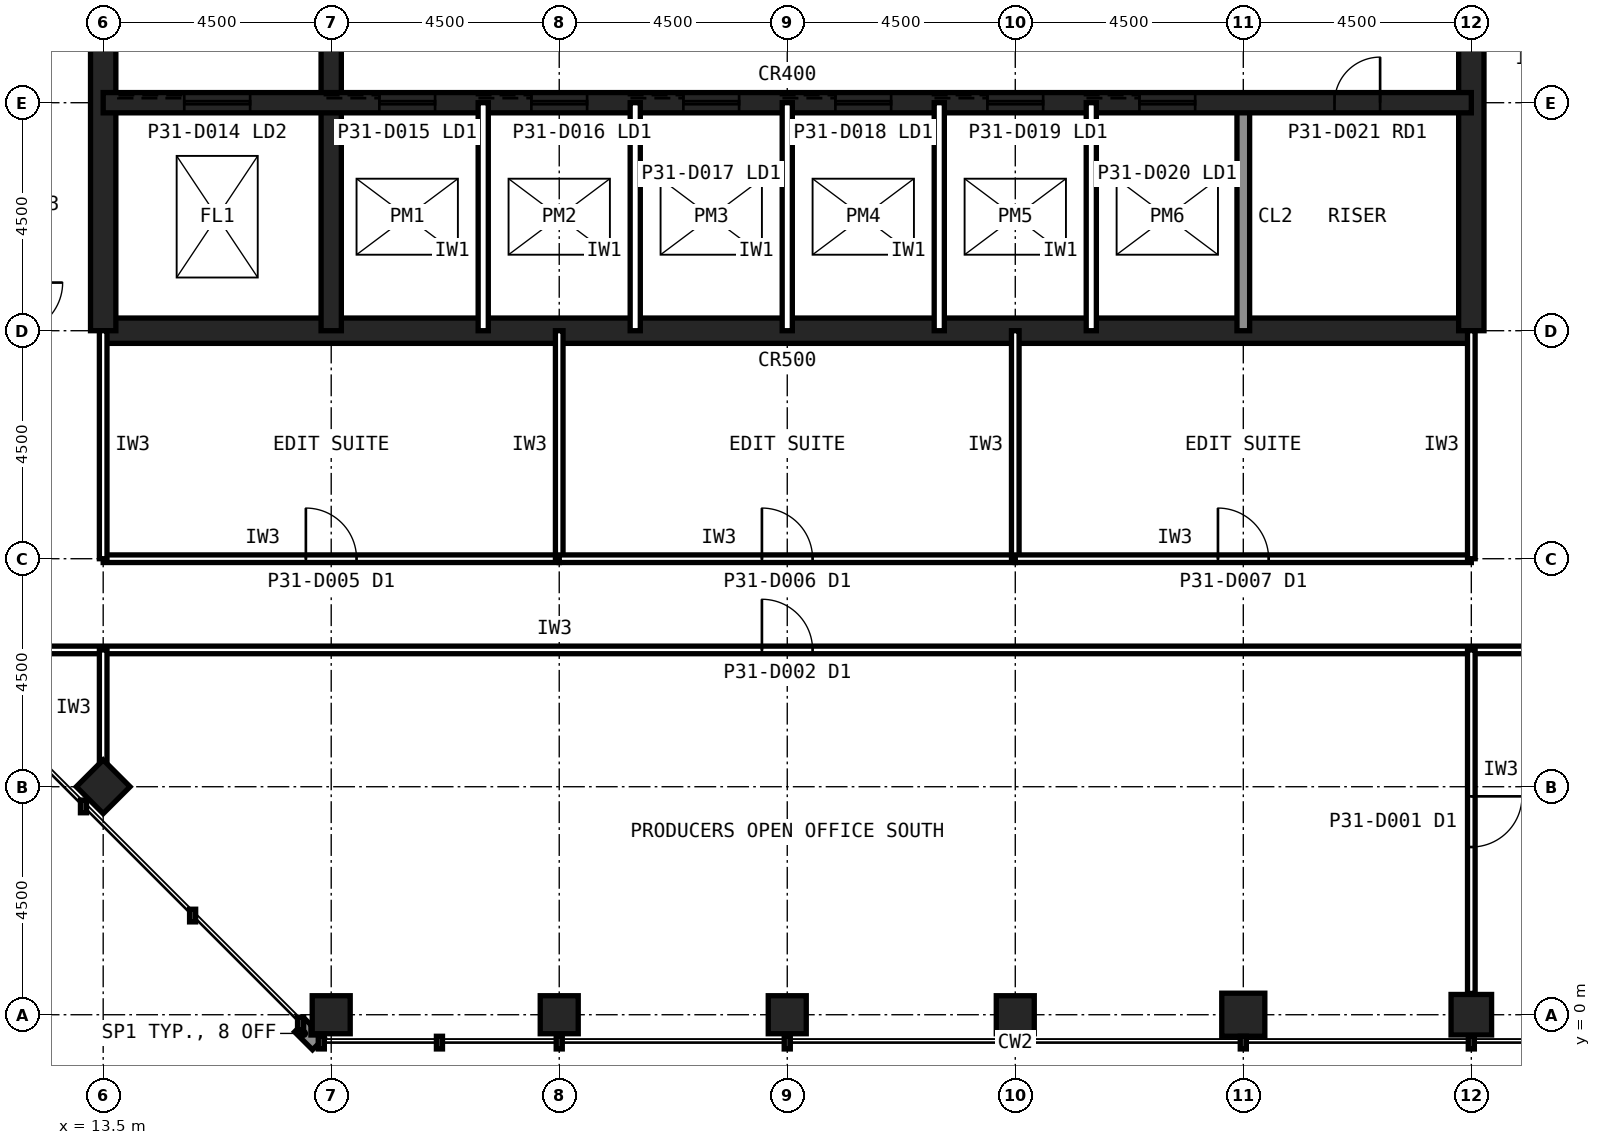
"""IFC4 building model, lengths in metres.
Left out: names, types, materials, properties, quantities, classifications, styles, units other than length and angle.
Written with IfcOpenShell. Run it as: python <this file> out.ifc"""

import sys

from ifc_helpers import new_model, si_unit, direction, frame, frame_2d, origin, origin_2d, place, context, subcontext, project, spatial, rectangle, hollow_rectangle, extrude, element, fill, save


model = new_model("IFC4")
c1 = context("Model", 3, precision=1e-05, world=origin(), true_north=direction((0.0, 1.0)))
c2 = subcontext(c1, "Body", "Model", "MODEL_VIEW")
j1 = project(units=[si_unit("LENGTHUNIT", "METRE"), si_unit("PLANEANGLEUNIT", "RADIAN")], contexts=[c1])
p1 = place(None, origin())
s1 = spatial("IfcSite", under=j1, at=p1, CompositionType="ELEMENT")
p2 = place(p1, origin())
s2 = spatial("IfcBuilding", under=s1, at=p2, CompositionType="ELEMENT")
p3 = place(p2, frame((0.0, 0.0, 135.6)))
s3 = spatial("IfcBuildingStorey", under=s2, at=p3, CompositionType="ELEMENT", Elevation=135.6)
for number, where, z_axis, x_axis in (
    (1, (18.0, 0.0, 0.0), (0.0, 0.0, 1.0), (1.0, 0.0, 0.0)),
    (2, (22.5, 0.0, 0.0), (0.0, 0.0, 1.0), (1.0, 0.0, 0.0)),
    (3, (27.0, 0.0, 0.0), (0.0, 0.0, 1.0), (1.0, 0.0, 0.0)),
    (4, (31.5, 0.0, 0.0), (0.0, 0.0, 1.0), (1.0, 0.0, 0.0)),
):
    element("IfcColumn", number, at=place(p3, frame(where, z_axis=z_axis, x_axis=x_axis)), inside=s3, PredefinedType="COLUMN", context=c2, shape_type="SweptSolid", body=[
        extrude(hollow_rectangle(XDim=0.75, YDim=0.75, WallThickness=0.04, at=origin_2d()), origin(), (0.0, 0.0, 1.0), 4.0),
    ])
p4 = place(p3, frame((36.0, 0.0, 0.0), z_axis=(0.0, 0.0, 1.0), x_axis=(1.0, 0.0, 0.0)))
e5 = element("IfcColumn", 5, at=p4, inside=s3, PredefinedType="COLUMN", context=c2, shape_type="SweptSolid", body=[
    extrude(hollow_rectangle(XDim=0.85, YDim=0.85, WallThickness=0.05, at=origin_2d()), origin(), (0.0, 0.0, 1.0), 4.0),
])
p5 = place(p3, frame((40.5, 0.0, 0.0), z_axis=(0.0, 0.0, 1.0), x_axis=(1.0, 0.0, 0.0)))
e6 = element("IfcColumn", 6, at=p5, inside=s3, PredefinedType="COLUMN", context=c2, shape_type="SweptSolid", body=[
    extrude(hollow_rectangle(XDim=0.8, YDim=0.8, WallThickness=0.045, at=origin_2d()), origin(), (0.0, 0.0, 1.0), 4.0),
])
p6 = place(p3, frame((13.5, 4.5, 0.0), z_axis=(0.0, 0.0, 1.0), x_axis=(0.707106781187, 0.707106781187, 0.0)))
e7 = element("IfcColumn", 7, at=p6, inside=s3, PredefinedType="COLUMN", context=c2, shape_type="SweptSolid", body=[
    extrude(hollow_rectangle(XDim=0.75, YDim=0.75, WallThickness=0.04, at=origin_2d()), origin(), (0.0, 0.0, 1.0), 4.0),
])
p7 = place(p3, frame((13.5, 13.5, 0.0), z_axis=(0.0, 0.0, 1.0), x_axis=(1.0, 0.0, 0.0)))
e8 = element("IfcWall", 8, at=p7, inside=s3, PredefinedType="SHEAR", context=c2, shape_type="SweptSolid", body=[
    extrude(rectangle(XDim=27.0, YDim=0.5, at=frame_2d((13.5, 0.0))), origin(), (0.0, 0.0, 1.0), 4.0),
])
p8 = place(p3, frame((40.5, 13.5, 0.0), z_axis=(0.0, 0.0, 1.0), x_axis=(0.0, 1.0, 0.0)))
e9 = element("IfcWall", 9, at=p8, inside=s3, PredefinedType="SHEAR", context=c2, shape_type="SweptSolid", body=[
    extrude(rectangle(XDim=27.0, YDim=0.5, at=frame_2d((13.5, 0.0))), origin(), (0.0, 0.0, 1.0), 4.0),
])
p9 = place(p8, frame((5.85, 0.0, 0.0)))
e10 = element("IfcOpeningElement", 10, at=p9, cuts=e9, PredefinedType="OPENING", context=c2, shape_type="SweptSolid", body=[
    extrude(rectangle(XDim=1.8, YDim=2.1, at=frame_2d((0.9, 1.05))), frame((0.0, 0.26, 0.0), z_axis=(0.0, -1.0, 0.0), x_axis=(1.0, 0.0, 0.0)), (0.0, 0.0, 1.0), 0.52),
])
p10 = place(p8, frame((19.65, 0.0, 0.0)))
e11 = element("IfcOpeningElement", 11, at=p10, cuts=e9, PredefinedType="OPENING", context=c2, shape_type="SweptSolid", body=[
    extrude(rectangle(XDim=1.2, YDim=2.1, at=frame_2d((0.6, 1.05))), frame((0.0, 0.26, 0.0), z_axis=(0.0, -1.0, 0.0), x_axis=(1.0, 0.0, 0.0)), (0.0, 0.0, 1.0), 0.52),
])
p11 = place(p3, frame((13.5, 40.5, 0.0), z_axis=(0.0, 0.0, 1.0), x_axis=(0.0, -1.0, 0.0)))
e12 = element("IfcWall", 12, at=p11, inside=s3, PredefinedType="SHEAR", context=c2, shape_type="SweptSolid", body=[
    extrude(rectangle(XDim=27.0, YDim=0.5, at=frame_2d((13.5, 0.0))), origin(), (0.0, 0.0, 1.0), 4.0),
])
p12 = place(p11, frame((19.65, 0.0, 0.0)))
e13 = element("IfcOpeningElement", 13, at=p12, cuts=e12, PredefinedType="OPENING", context=c2, shape_type="SweptSolid", body=[
    extrude(rectangle(XDim=1.2, YDim=2.1, at=frame_2d((0.6, 1.05))), frame((0.0, 0.26, 0.0), z_axis=(0.0, -1.0, 0.0), x_axis=(1.0, 0.0, 0.0)), (0.0, 0.0, 1.0), 0.52),
])
p13 = place(p11, frame((5.85, 0.0, 0.0)))
e14 = element("IfcOpeningElement", 14, at=p13, cuts=e12, PredefinedType="OPENING", context=c2, shape_type="SweptSolid", body=[
    extrude(rectangle(XDim=1.8, YDim=2.1, at=frame_2d((0.9, 1.05))), frame((0.0, 0.26, 0.0), z_axis=(0.0, -1.0, 0.0), x_axis=(1.0, 0.0, 0.0)), (0.0, 0.0, 1.0), 0.52),
])
p14 = place(p3, frame((18.0, 13.5, 0.0), z_axis=(0.0, 0.0, 1.0), x_axis=(0.0, 1.0, 0.0)))
e15 = element("IfcWall", 15, at=p14, inside=s3, PredefinedType="SHEAR", context=c2, shape_type="SweptSolid", body=[
    extrude(rectangle(XDim=18.0, YDim=0.4, at=frame_2d((9.0, 0.0))), origin(), (0.0, 0.0, 1.0), 4.0),
])
p15 = place(p3, frame((36.0, 13.5, 0.0), z_axis=(0.0, 0.0, 1.0), x_axis=(0.0, 1.0, 0.0)))
e16 = element("IfcWall", 16, at=p15, inside=s3, PredefinedType="SOLIDWALL", context=c2, shape_type="SweptSolid", body=[
    extrude(rectangle(XDim=4.5, YDim=0.25, at=frame_2d((2.25, 0.0))), origin(), (0.0, 0.0, 1.0), 3.84),
])
p16 = place(p3, frame((13.5, 18.0, 0.0), z_axis=(0.0, 0.0, 1.0), x_axis=(1.0, 0.0, 0.0)))
e17 = element("IfcWall", 17, at=p16, inside=s3, PredefinedType="SHEAR", context=c2, shape_type="SweptSolid", body=[
    extrude(rectangle(XDim=27.0, YDim=0.4, at=frame_2d((13.5, 0.0))), origin(), (0.0, 0.0, 1.0), 4.0),
])
p17 = place(p16, frame((24.3, 0.0, 0.0)))
e18 = element("IfcOpeningElement", 18, at=p17, cuts=e17, PredefinedType="OPENING", context=c2, shape_type="SweptSolid", body=[
    extrude(rectangle(XDim=0.9, YDim=2.1, at=frame_2d((0.45, 1.05))), frame((0.0, 0.21, 0.0), z_axis=(0.0, -1.0, 0.0), x_axis=(1.0, 0.0, 0.0)), (0.0, 0.0, 1.0), 0.42),
])
p18 = place(p16, frame((5.45, 0.0, 0.0)))
e19 = element("IfcOpeningElement", 19, at=p18, cuts=e17, PredefinedType="OPENING", context=c2, shape_type="SweptSolid", body=[
    extrude(rectangle(XDim=1.1, YDim=2.1, at=frame_2d((0.55, 1.05))), frame((0.0, 0.21, 0.0), z_axis=(0.0, -1.0, 0.0), x_axis=(1.0, 0.0, 0.0)), (0.0, 0.0, 1.0), 0.42),
])
p19 = place(p16, frame((8.45, 0.0, 0.0)))
e20 = element("IfcOpeningElement", 20, at=p19, cuts=e17, PredefinedType="OPENING", context=c2, shape_type="SweptSolid", body=[
    extrude(rectangle(XDim=1.1, YDim=2.1, at=frame_2d((0.55, 1.05))), frame((0.0, 0.21, 0.0), z_axis=(0.0, -1.0, 0.0), x_axis=(1.0, 0.0, 0.0)), (0.0, 0.0, 1.0), 0.42),
])
p20 = place(p16, frame((11.45, 0.0, 0.0)))
e21 = element("IfcOpeningElement", 21, at=p20, cuts=e17, PredefinedType="OPENING", context=c2, shape_type="SweptSolid", body=[
    extrude(rectangle(XDim=1.1, YDim=2.1, at=frame_2d((0.55, 1.05))), frame((0.0, 0.21, 0.0), z_axis=(0.0, -1.0, 0.0), x_axis=(1.0, 0.0, 0.0)), (0.0, 0.0, 1.0), 0.42),
])
p21 = place(p16, frame((14.45, 0.0, 0.0)))
e22 = element("IfcOpeningElement", 22, at=p21, cuts=e17, PredefinedType="OPENING", context=c2, shape_type="SweptSolid", body=[
    extrude(rectangle(XDim=1.1, YDim=2.1, at=frame_2d((0.55, 1.05))), frame((0.0, 0.21, 0.0), z_axis=(0.0, -1.0, 0.0), x_axis=(1.0, 0.0, 0.0)), (0.0, 0.0, 1.0), 0.42),
])
p22 = place(p16, frame((17.45, 0.0, 0.0)))
e23 = element("IfcOpeningElement", 23, at=p22, cuts=e17, PredefinedType="OPENING", context=c2, shape_type="SweptSolid", body=[
    extrude(rectangle(XDim=1.1, YDim=2.1, at=frame_2d((0.55, 1.05))), frame((0.0, 0.21, 0.0), z_axis=(0.0, -1.0, 0.0), x_axis=(1.0, 0.0, 0.0)), (0.0, 0.0, 1.0), 0.42),
])
p23 = place(p16, frame((20.45, 0.0, 0.0)))
e24 = element("IfcOpeningElement", 24, at=p23, cuts=e17, PredefinedType="OPENING", context=c2, shape_type="SweptSolid", body=[
    extrude(rectangle(XDim=1.1, YDim=2.1, at=frame_2d((0.55, 1.05))), frame((0.0, 0.21, 0.0), z_axis=(0.0, -1.0, 0.0), x_axis=(1.0, 0.0, 0.0)), (0.0, 0.0, 1.0), 0.42),
])
p24 = place(p16, frame((1.6, 0.0, 0.0)))
e25 = element("IfcOpeningElement", 25, at=p24, cuts=e17, PredefinedType="OPENING", context=c2, shape_type="SweptSolid", body=[
    extrude(rectangle(XDim=1.3, YDim=2.2, at=frame_2d((0.65, 1.1))), frame((0.0, 0.21, 0.0), z_axis=(0.0, -1.0, 0.0), x_axis=(1.0, 0.0, 0.0)), (0.0, 0.0, 1.0), 0.42),
])
for number, where, z_axis, x_axis in (
    (26, (21.0, 13.5, 0.0), (0.0, 0.0, 1.0), (0.0, 1.0, 0.0)),
    (27, (24.0, 13.5, 0.0), (0.0, 0.0, 1.0), (0.0, 1.0, 0.0)),
    (28, (27.0, 13.5, 0.0), (0.0, 0.0, 1.0), (0.0, 1.0, 0.0)),
    (29, (30.0, 13.5, 0.0), (0.0, 0.0, 1.0), (0.0, 1.0, 0.0)),
    (30, (33.0, 13.5, 0.0), (0.0, 0.0, 1.0), (0.0, 1.0, 0.0)),
):
    element("IfcWall", number, at=place(p3, frame(where, z_axis=z_axis, x_axis=x_axis)), inside=s3, PredefinedType="PARTITIONING", context=c2, shape_type="SweptSolid", body=[
        extrude(rectangle(XDim=4.5, YDim=0.2, at=frame_2d((2.25, 0.0))), origin(), (0.0, 0.0, 1.0), 3.84),
    ])
p25 = place(p3, frame((11.7, 7.2, 0.0), z_axis=(0.0, 0.0, 1.0), x_axis=(1.0, 0.0, 0.0)))
e31 = element("IfcWall", 31, at=p25, inside=s3, PredefinedType="PARTITIONING", context=c2, shape_type="SweptSolid", body=[
    extrude(rectangle(XDim=30.6, YDim=0.15, at=frame_2d((15.3, 0.0))), origin(), (0.0, 0.0, 1.0), 3.84),
])
p26 = place(p25, frame((14.8, 0.0, 0.0)))
e32 = element("IfcOpeningElement", 32, at=p26, cuts=e31, PredefinedType="OPENING", context=c2, shape_type="SweptSolid", body=[
    extrude(rectangle(XDim=1.0, YDim=2.1, at=frame_2d((0.5, 1.05))), frame((0.0, 0.085, 0.0), z_axis=(0.0, -1.0, 0.0), x_axis=(1.0, 0.0, 0.0)), (0.0, 0.0, 1.0), 0.17),
])
p27 = place(p3, frame((13.5, 9.0, 0.0), z_axis=(0.0, 0.0, 1.0), x_axis=(1.0, 0.0, 0.0)))
e33 = element("IfcWall", 33, at=p27, inside=s3, PredefinedType="PARTITIONING", context=c2, shape_type="SweptSolid", body=[
    extrude(rectangle(XDim=9.0, YDim=0.15, at=frame_2d((4.5, 0.0))), origin(), (0.0, 0.0, 1.0), 3.84),
])
p28 = place(p27, frame((4.0, 0.0, 0.0)))
e34 = element("IfcOpeningElement", 34, at=p28, cuts=e33, PredefinedType="OPENING", context=c2, shape_type="SweptSolid", body=[
    extrude(rectangle(XDim=1.0, YDim=2.1, at=frame_2d((0.5, 1.05))), frame((0.0, 0.085, 0.0), z_axis=(0.0, -1.0, 0.0), x_axis=(1.0, 0.0, 0.0)), (0.0, 0.0, 1.0), 0.17),
])
for number, where, z_axis, x_axis in (
    (35, (22.5, 9.0, 0.0), (0.0, 0.0, 1.0), (0.0, 1.0, 0.0)),
    (36, (13.5, 13.5, 0.0), (0.0, 0.0, 1.0), (0.0, -1.0, 0.0)),
):
    element("IfcWall", number, at=place(p3, frame(where, z_axis=z_axis, x_axis=x_axis)), inside=s3, PredefinedType="PARTITIONING", context=c2, shape_type="SweptSolid", body=[
        extrude(rectangle(XDim=4.5, YDim=0.15, at=frame_2d((2.25, 0.0))), origin(), (0.0, 0.0, 1.0), 2.989),
    ])
p29 = place(p3, frame((22.5, 9.0, 0.0), z_axis=(0.0, 0.0, 1.0), x_axis=(1.0, 0.0, 0.0)))
e37 = element("IfcWall", 37, at=p29, inside=s3, PredefinedType="PARTITIONING", context=c2, shape_type="SweptSolid", body=[
    extrude(rectangle(XDim=9.0, YDim=0.15, at=frame_2d((4.5, 0.0))), origin(), (0.0, 0.0, 1.0), 3.84),
])
p30 = place(p29, frame((4.0, 0.0, 0.0)))
e38 = element("IfcOpeningElement", 38, at=p30, cuts=e37, PredefinedType="OPENING", context=c2, shape_type="SweptSolid", body=[
    extrude(rectangle(XDim=1.0, YDim=2.1, at=frame_2d((0.5, 1.05))), frame((0.0, 0.085, 0.0), z_axis=(0.0, -1.0, 0.0), x_axis=(1.0, 0.0, 0.0)), (0.0, 0.0, 1.0), 0.17),
])
p31 = place(p3, frame((31.5, 9.0, 0.0), z_axis=(0.0, 0.0, 1.0), x_axis=(0.0, 1.0, 0.0)))
e39 = element("IfcWall", 39, at=p31, inside=s3, PredefinedType="PARTITIONING", context=c2, shape_type="SweptSolid", body=[
    extrude(rectangle(XDim=4.5, YDim=0.15, at=frame_2d((2.25, 0.0))), origin(), (0.0, 0.0, 1.0), 2.989),
])
p32 = place(p3, frame((31.5, 9.0, 0.0), z_axis=(0.0, 0.0, 1.0), x_axis=(1.0, 0.0, 0.0)))
e40 = element("IfcWall", 40, at=p32, inside=s3, PredefinedType="PARTITIONING", context=c2, shape_type="SweptSolid", body=[
    extrude(rectangle(XDim=9.0, YDim=0.15, at=frame_2d((4.5, 0.0))), origin(), (0.0, 0.0, 1.0), 3.84),
])
p33 = place(p32, frame((4.0, 0.0, 0.0)))
e41 = element("IfcOpeningElement", 41, at=p33, cuts=e40, PredefinedType="OPENING", context=c2, shape_type="SweptSolid", body=[
    extrude(rectangle(XDim=1.0, YDim=2.1, at=frame_2d((0.5, 1.05))), frame((0.0, 0.085, 0.0), z_axis=(0.0, -1.0, 0.0), x_axis=(1.0, 0.0, 0.0)), (0.0, 0.0, 1.0), 0.17),
])
p34 = place(p3, frame((40.5, 9.0, 0.0), z_axis=(0.0, 0.0, 1.0), x_axis=(0.0, 1.0, 0.0)))
e42 = element("IfcWall", 42, at=p34, inside=s3, PredefinedType="PARTITIONING", context=c2, shape_type="SweptSolid", body=[
    extrude(rectangle(XDim=4.5, YDim=0.15, at=frame_2d((2.25, 0.0))), origin(), (0.0, 0.0, 1.0), 2.989),
])
p35 = place(p3, frame((13.5, 4.895, 0.0), z_axis=(0.0, 0.0, 1.0), x_axis=(0.0, 1.0, 0.0)))
e43 = element("IfcWall", 43, at=p35, inside=s3, PredefinedType="PARTITIONING", context=c2, shape_type="SweptSolid", body=[
    extrude(rectangle(XDim=2.305, YDim=0.15, at=frame_2d((1.152, 0.0))), origin(), (0.0, 0.0, 1.0), 2.989),
])
p36 = place(p3, frame((40.5, 7.2, 0.0), z_axis=(0.0, 0.0, 1.0), x_axis=(0.0, -1.0, 0.0)))
e44 = element("IfcWall", 44, at=p36, inside=s3, PredefinedType="PARTITIONING", context=c2, shape_type="SweptSolid", body=[
    extrude(rectangle(XDim=6.78, YDim=0.15, at=frame_2d((3.39, 0.0))), origin(), (0.0, 0.0, 1.0), 2.989),
])
p37 = place(p36, frame((2.89, 0.0, 0.0)))
e45 = element("IfcOpeningElement", 45, at=p37, cuts=e44, PredefinedType="OPENING", context=c2, shape_type="SweptSolid", body=[
    extrude(rectangle(XDim=1.0, YDim=2.1, at=frame_2d((0.5, 1.05))), frame((0.0, 0.085, 0.0), z_axis=(0.0, -1.0, 0.0), x_axis=(1.0, 0.0, 0.0)), (0.0, 0.0, 1.0), 0.17),
])
p38 = place(p17, origin())
e46 = element("IfcDoor", 46, at=p38, inside=s3, OperationType="SINGLE_SWING_RIGHT", PredefinedType="DOOR", context=c2, shape_type="SweptSolid", body=[
    extrude(rectangle(XDim=0.9, YDim=2.1, at=frame_2d((0.45, 1.05))), frame((0.0, 0.025, 0.0), z_axis=(0.0, -1.0, 0.0), x_axis=(1.0, 0.0, 0.0)), (0.0, 0.0, 1.0), 0.05),
])
fill(e18, e46)
p39 = place(p18, origin())
e47 = element("IfcDoor", 47, at=p39, inside=s3, OperationType="SLIDING_TO_LEFT", PredefinedType="DOOR", context=c2, shape_type="SweptSolid", body=[
    extrude(rectangle(XDim=1.1, YDim=2.1, at=frame_2d((0.55, 1.05))), frame((0.0, 0.025, 0.0), z_axis=(0.0, -1.0, 0.0), x_axis=(1.0, 0.0, 0.0)), (0.0, 0.0, 1.0), 0.05),
])
fill(e19, e47)
p40 = place(p19, origin())
e48 = element("IfcDoor", 48, at=p40, inside=s3, OperationType="SLIDING_TO_LEFT", PredefinedType="DOOR", context=c2, shape_type="SweptSolid", body=[
    extrude(rectangle(XDim=1.1, YDim=2.1, at=frame_2d((0.55, 1.05))), frame((0.0, 0.025, 0.0), z_axis=(0.0, -1.0, 0.0), x_axis=(1.0, 0.0, 0.0)), (0.0, 0.0, 1.0), 0.05),
])
fill(e20, e48)
p41 = place(p20, origin())
e49 = element("IfcDoor", 49, at=p41, inside=s3, OperationType="SLIDING_TO_LEFT", PredefinedType="DOOR", context=c2, shape_type="SweptSolid", body=[
    extrude(rectangle(XDim=1.1, YDim=2.1, at=frame_2d((0.55, 1.05))), frame((0.0, 0.025, 0.0), z_axis=(0.0, -1.0, 0.0), x_axis=(1.0, 0.0, 0.0)), (0.0, 0.0, 1.0), 0.05),
])
fill(e21, e49)
p42 = place(p21, origin())
e50 = element("IfcDoor", 50, at=p42, inside=s3, OperationType="SLIDING_TO_LEFT", PredefinedType="DOOR", context=c2, shape_type="SweptSolid", body=[
    extrude(rectangle(XDim=1.1, YDim=2.1, at=frame_2d((0.55, 1.05))), frame((0.0, 0.025, 0.0), z_axis=(0.0, -1.0, 0.0), x_axis=(1.0, 0.0, 0.0)), (0.0, 0.0, 1.0), 0.05),
])
fill(e22, e50)
p43 = place(p22, origin())
e51 = element("IfcDoor", 51, at=p43, inside=s3, OperationType="SLIDING_TO_LEFT", PredefinedType="DOOR", context=c2, shape_type="SweptSolid", body=[
    extrude(rectangle(XDim=1.1, YDim=2.1, at=frame_2d((0.55, 1.05))), frame((0.0, 0.025, 0.0), z_axis=(0.0, -1.0, 0.0), x_axis=(1.0, 0.0, 0.0)), (0.0, 0.0, 1.0), 0.05),
])
fill(e23, e51)
p44 = place(p23, origin())
e52 = element("IfcDoor", 52, at=p44, inside=s3, OperationType="SLIDING_TO_LEFT", PredefinedType="DOOR", context=c2, shape_type="SweptSolid", body=[
    extrude(rectangle(XDim=1.1, YDim=2.1, at=frame_2d((0.55, 1.05))), frame((0.0, 0.025, 0.0), z_axis=(0.0, -1.0, 0.0), x_axis=(1.0, 0.0, 0.0)), (0.0, 0.0, 1.0), 0.05),
])
fill(e24, e52)
p45 = place(p24, origin())
e53 = element("IfcDoor", 53, at=p45, inside=s3, OperationType="SLIDING_TO_LEFT", PredefinedType="DOOR", context=c2, shape_type="SweptSolid", body=[
    extrude(rectangle(XDim=1.3, YDim=2.2, at=frame_2d((0.65, 1.1))), frame((0.0, 0.025, 0.0), z_axis=(0.0, -1.0, 0.0), x_axis=(1.0, 0.0, 0.0)), (0.0, 0.0, 1.0), 0.05),
])
fill(e25, e53)
p46 = place(p26, origin())
e54 = element("IfcDoor", 54, at=p46, inside=s3, OperationType="SINGLE_SWING_LEFT", PredefinedType="DOOR", context=c2, shape_type="SweptSolid", body=[
    extrude(rectangle(XDim=1.0, YDim=2.1, at=frame_2d((0.5, 1.05))), frame((0.0, 0.025, 0.0), z_axis=(0.0, -1.0, 0.0), x_axis=(1.0, 0.0, 0.0)), (0.0, 0.0, 1.0), 0.05),
])
fill(e32, e54)
p47 = place(p28, origin())
e55 = element("IfcDoor", 55, at=p47, inside=s3, OperationType="SINGLE_SWING_LEFT", PredefinedType="DOOR", context=c2, shape_type="SweptSolid", body=[
    extrude(rectangle(XDim=1.0, YDim=2.1, at=frame_2d((0.5, 1.05))), frame((0.0, 0.025, 0.0), z_axis=(0.0, -1.0, 0.0), x_axis=(1.0, 0.0, 0.0)), (0.0, 0.0, 1.0), 0.05),
])
fill(e34, e55)
p48 = place(p30, origin())
e56 = element("IfcDoor", 56, at=p48, inside=s3, OperationType="SINGLE_SWING_LEFT", PredefinedType="DOOR", context=c2, shape_type="SweptSolid", body=[
    extrude(rectangle(XDim=1.0, YDim=2.1, at=frame_2d((0.5, 1.05))), frame((0.0, 0.025, 0.0), z_axis=(0.0, -1.0, 0.0), x_axis=(1.0, 0.0, 0.0)), (0.0, 0.0, 1.0), 0.05),
])
fill(e38, e56)
p49 = place(p33, origin())
e57 = element("IfcDoor", 57, at=p49, inside=s3, OperationType="SINGLE_SWING_LEFT", PredefinedType="DOOR", context=c2, shape_type="SweptSolid", body=[
    extrude(rectangle(XDim=1.0, YDim=2.1, at=frame_2d((0.5, 1.05))), frame((0.0, 0.025, 0.0), z_axis=(0.0, -1.0, 0.0), x_axis=(1.0, 0.0, 0.0)), (0.0, 0.0, 1.0), 0.05),
])
fill(e41, e57)
p50 = place(p37, origin())
e58 = element("IfcDoor", 58, at=p50, inside=s3, OperationType="SINGLE_SWING_LEFT", PredefinedType="DOOR", context=c2, shape_type="SweptSolid", body=[
    extrude(rectangle(XDim=1.0, YDim=2.1, at=frame_2d((0.5, 1.05))), frame((0.0, 0.025, 0.0), z_axis=(0.0, -1.0, 0.0), x_axis=(1.0, 0.0, 0.0)), (0.0, 0.0, 1.0), 0.05),
])
fill(e45, e58)
save(model, sys.argv[1])
